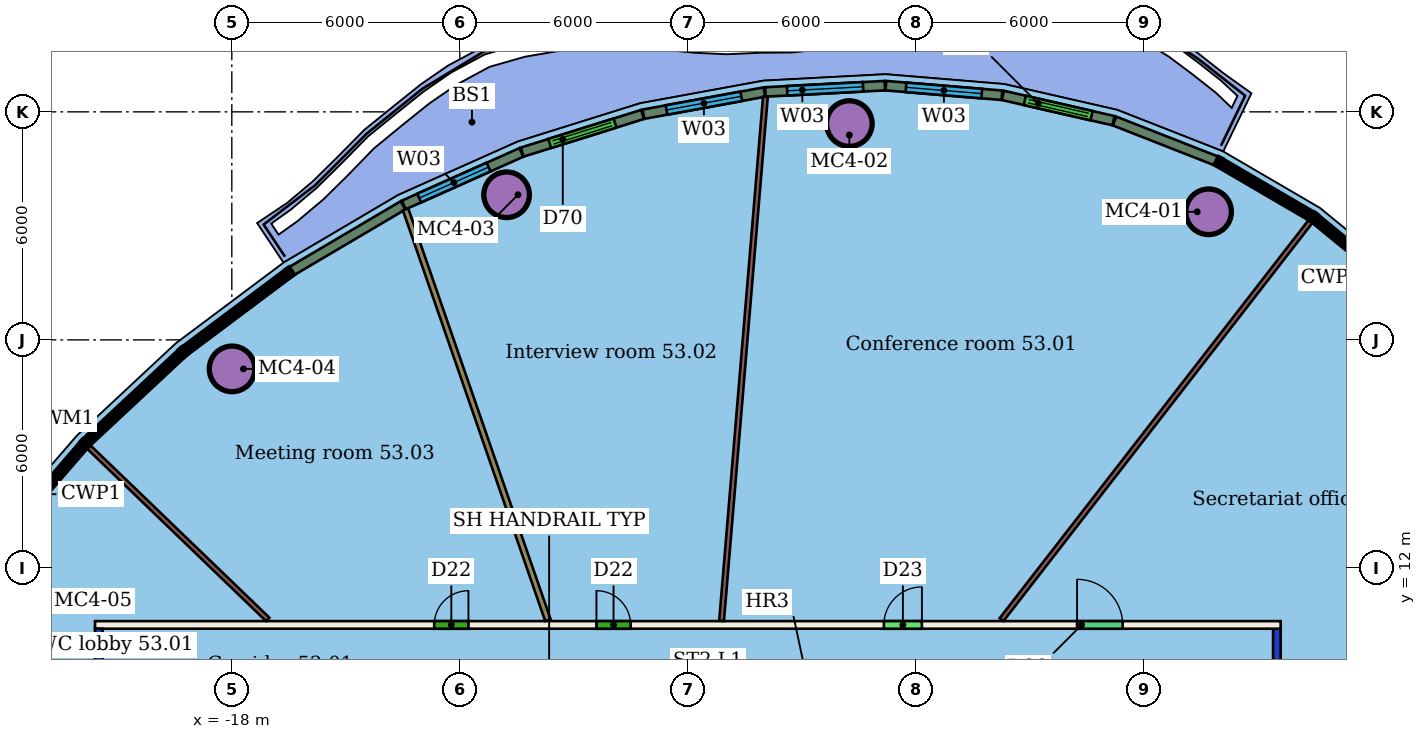
"""IFC4 building model, lengths in metres.
Left out: names, types, materials, properties, quantities, classifications, styles, units other than length and angle.
Written with IfcOpenShell. Run it as: python <this file> out.ifc"""

import sys

from ifc_helpers import new_model, si_unit, direction, frame, frame_2d, origin, origin_2d, place, context, subcontext, project, spatial, rectangle, hollow_circle, extrude, element, fill, save


model = new_model("IFC4")
c1 = context("Model", 3, precision=1e-05, world=origin(), true_north=direction((0.0, 1.0)))
c2 = subcontext(c1, "Body", "Model", "MODEL_VIEW")
j1 = project(units=[si_unit("LENGTHUNIT", "METRE"), si_unit("PLANEANGLEUNIT", "RADIAN")], contexts=[c1])
p1 = place(None, origin())
s1 = spatial("IfcSite", under=j1, at=p1, CompositionType="ELEMENT")
p2 = place(p1, origin())
s2 = spatial("IfcBuilding", under=s1, at=p2, CompositionType="ELEMENT")
p3 = place(p2, frame((0.0, 0.0, 217.3)))
s3 = spatial("IfcBuildingStorey", under=s2, at=p3, CompositionType="ELEMENT", Elevation=217.3)
for number, where, z_axis, x_axis in (
    (1, (7.704, 21.37, 0.0), (0.0, 0.0, 1.0), (1.0, 0.0, 0.0)),
    (2, (-1.75, 23.691, 0.0), (0.0, 0.0, 1.0), (1.0, 0.0, 0.0)),
    (3, (-10.769, 21.819, 0.0), (0.0, 0.0, 1.0), (1.0, 0.0, 0.0)),
    (4, (-17.993, 17.237, 0.0), (0.0, 0.0, 1.0), (1.0, 0.0, 0.0)),
):
    element("IfcColumn", number, at=place(p3, frame(where, z_axis=z_axis, x_axis=x_axis)), inside=s3, PredefinedType="COLUMN", context=c2, shape_type="SweptSolid", body=[
        extrude(hollow_circle(Radius=0.6, WallThickness=0.045, at=origin_2d()), origin(), (0.0, 0.0, 1.0), 3.45),
    ])
p4 = place(p3, frame((-21.5, -10.4, 0.0), z_axis=(0.0, 0.0, 1.0), x_axis=(0.0, 1.0, 0.0)))
e5 = element("IfcWall", 5, at=p4, inside=s3, PredefinedType="PARTITIONING", context=c2, shape_type="SweptSolid", body=[
    extrude(rectangle(XDim=20.8, YDim=0.2, at=frame_2d((10.4, 0.0))), origin(), (0.0, 0.0, 1.0), 3.05),
])
p5 = place(p4, frame((13.596, 0.0, 0.0)))
e6 = element("IfcOpeningElement", 6, at=p5, cuts=e5, PredefinedType="OPENING", context=c2, shape_type="SweptSolid", body=[
    extrude(rectangle(XDim=1.0, YDim=2.4, at=frame_2d((0.5, 1.2))), frame((0.0, 0.11, 0.0), z_axis=(0.0, -1.0, 0.0), x_axis=(1.0, 0.0, 0.0)), (0.0, 0.0, 1.0), 0.22),
])
p6 = place(p4, frame((5.876, 0.0, 0.0)))
e7 = element("IfcOpeningElement", 7, at=p6, cuts=e5, PredefinedType="OPENING", context=c2, shape_type="SweptSolid", body=[
    extrude(rectangle(XDim=1.8, YDim=2.4, at=frame_2d((0.9, 1.2))), frame((0.0, 0.11, 0.0), z_axis=(0.0, -1.0, 0.0), x_axis=(1.0, 0.0, 0.0)), (0.0, 0.0, 1.0), 0.22),
])
p7 = place(p3, frame((-21.6, 10.5, 0.0), z_axis=(0.0, 0.0, 1.0), x_axis=(1.0, 0.0, 0.0)))
e8 = element("IfcWall", 8, at=p7, inside=s3, PredefinedType="PARTITIONING", context=c2, shape_type="SweptSolid", body=[
    extrude(rectangle(XDim=31.2, YDim=0.2, at=frame_2d((15.6, 0.0))), origin(), (0.0, 0.0, 1.0), 3.45),
])
p8 = place(p7, frame((20.759, 0.0, 0.0)))
e9 = element("IfcOpeningElement", 9, at=p8, cuts=e8, PredefinedType="OPENING", context=c2, shape_type="SweptSolid", body=[
    extrude(rectangle(XDim=1.0, YDim=2.4, at=frame_2d((0.5, 1.2))), frame((0.0, 0.11, 0.0), z_axis=(0.0, -1.0, 0.0), x_axis=(1.0, 0.0, 0.0)), (0.0, 0.0, 1.0), 0.22),
])
p9 = place(p7, frame((13.195, 0.0, 0.0)))
e10 = element("IfcOpeningElement", 10, at=p9, cuts=e8, PredefinedType="OPENING", context=c2, shape_type="SweptSolid", body=[
    extrude(rectangle(XDim=0.9, YDim=2.1, at=frame_2d((0.45, 1.05))), frame((0.0, 0.11, 0.0), z_axis=(0.0, -1.0, 0.0), x_axis=(1.0, 0.0, 0.0)), (0.0, 0.0, 1.0), 0.22),
])
p10 = place(p7, frame((8.927, 0.0, 0.0)))
e11 = element("IfcOpeningElement", 11, at=p10, cuts=e8, PredefinedType="OPENING", context=c2, shape_type="SweptSolid", body=[
    extrude(rectangle(XDim=0.9, YDim=2.1, at=frame_2d((0.45, 1.05))), frame((0.0, 0.11, 0.0), z_axis=(0.0, -1.0, 0.0), x_axis=(1.0, 0.0, 0.0)), (0.0, 0.0, 1.0), 0.22),
])
p11 = place(p7, frame((25.843, 0.0, 0.0)))
e12 = element("IfcOpeningElement", 12, at=p11, cuts=e8, PredefinedType="OPENING", context=c2, shape_type="SweptSolid", body=[
    extrude(rectangle(XDim=1.2, YDim=2.4, at=frame_2d((0.6, 1.2))), frame((0.0, 0.11, 0.0), z_axis=(0.0, -1.0, 0.0), x_axis=(1.0, 0.0, 0.0)), (0.0, 0.0, 1.0), 0.22),
])
p12 = place(p3, frame((9.5, 10.4, 0.0), z_axis=(0.0, 0.0, 1.0), x_axis=(0.0, -1.0, 0.0)))
e13 = element("IfcWall", 13, at=p12, inside=s3, PredefinedType="PARTITIONING", context=c2, shape_type="SweptSolid", body=[
    extrude(rectangle(XDim=20.8, YDim=0.2, at=frame_2d((10.4, 0.0))), origin(), (0.0, 0.0, 1.0), 3.05),
])
p13 = place(p12, frame((14.911, 0.0, 0.0)))
e14 = element("IfcOpeningElement", 14, at=p13, cuts=e13, PredefinedType="OPENING", context=c2, shape_type="SweptSolid", body=[
    extrude(rectangle(XDim=0.9, YDim=2.1, at=frame_2d((0.45, 1.05))), frame((0.0, 0.11, 0.0), z_axis=(0.0, -1.0, 0.0), x_axis=(1.0, 0.0, 0.0)), (0.0, 0.0, 1.0), 0.22),
])
p14 = place(p12, frame((4.489, 0.0, 0.0)))
e15 = element("IfcOpeningElement", 15, at=p14, cuts=e13, PredefinedType="OPENING", context=c2, shape_type="SweptSolid", body=[
    extrude(rectangle(XDim=1.5, YDim=2.1, at=frame_2d((0.75, 1.05))), frame((0.0, 0.11, 0.0), z_axis=(0.0, -1.0, 0.0), x_axis=(1.0, 0.0, 0.0)), (0.0, 0.0, 1.0), 0.22),
])
p15 = place(p3, frame((10.391, 21.124, 0.0), z_axis=(0.0, 0.0, 1.0), x_axis=(-0.613043629226, -0.790049054594, 0.0)))
e16 = element("IfcWall", 16, at=p15, inside=s3, PredefinedType="PARTITIONING", context=c2, shape_type="SweptSolid", body=[
    extrude(rectangle(XDim=13.271, YDim=0.125, at=frame_2d((6.636, 0.0))), origin(), (0.0, 0.0, 1.0), 3.45),
])
p16 = place(p3, frame((-3.958, 24.399, 0.0), z_axis=(0.0, 0.0, 1.0), x_axis=(-0.083375368872, -0.996518212511, 0.0)))
e17 = element("IfcWall", 17, at=p16, inside=s3, PredefinedType="PARTITIONING", context=c2, shape_type="SweptSolid", body=[
    extrude(rectangle(XDim=13.842, YDim=0.125, at=frame_2d((6.921, 0.0))), origin(), (0.0, 0.0, 1.0), 3.45),
])
p17 = place(p3, frame((-13.428, 21.434, 0.0), z_axis=(0.0, 0.0, 1.0), x_axis=(0.327447705094, -0.944869303358, 0.0)))
e18 = element("IfcWall", 18, at=p17, inside=s3, PredefinedType="PARTITIONING", context=c2, shape_type="SweptSolid", body=[
    extrude(rectangle(XDim=11.44, YDim=0.15, at=frame_2d((5.72, 0.0))), origin(), (0.0, 0.0, 1.0), 3.45),
])
p18 = place(p3, frame((-21.771, 15.187, 0.0), z_axis=(0.0, 0.0, 1.0), x_axis=(0.72030986436, -0.69365243408, 0.0)))
e19 = element("IfcWall", 19, at=p18, inside=s3, PredefinedType="PARTITIONING", context=c2, shape_type="SweptSolid", body=[
    extrude(rectangle(XDim=6.548, YDim=0.125, at=frame_2d((3.274, 0.0))), origin(), (0.0, 0.0, 1.0), 3.45),
])
p19 = place(p3, frame((17.207, 12.061, 0.0), z_axis=(0.0, 0.0, 1.0), x_axis=(-0.887319286248, -0.461155596574, 0.0)))
e20 = element("IfcWall", 20, at=p19, inside=s3, PredefinedType="PARTITIONING", context=c2, shape_type="SweptSolid", body=[
    extrude(rectangle(XDim=8.54, YDim=0.125, at=frame_2d((4.27, 0.0))), origin(), (0.0, 0.0, 1.0), 3.45),
])
p20 = place(p3, frame((7.907, 22.708, 0.0), z_axis=(0.0, 0.0, 1.0), x_axis=(-0.930924579426, 0.365211483146, 0.0)))
e21 = element("IfcWall", 21, at=p20, inside=s3, PredefinedType="SOLIDWALL", context=c2, shape_type="SweptSolid", body=[
    extrude(rectangle(XDim=2.878, YDim=0.25, at=frame_2d((1.439, 0.0))), origin(), (0.0, 0.0, 1.0), 3.1),
])
p21 = place(p3, frame((5.202, 23.767, 0.0), z_axis=(0.0, 0.0, 1.0), x_axis=(-0.974849372508, 0.222864759263, 0.0)))
e22 = element("IfcWall", 22, at=p21, inside=s3, PredefinedType="SOLIDWALL", context=c2, shape_type="SweptSolid", body=[
    extrude(rectangle(XDim=2.986, YDim=0.25, at=frame_2d((1.493, 0.0))), origin(), (0.0, 0.0, 1.0), 3.1),
])
p22 = place(p21, frame((0.593, 0.0, 0.0)))
e23 = element("IfcOpeningElement", 23, at=p22, cuts=e22, PredefinedType="OPENING", context=c2, shape_type="SweptSolid", body=[
    extrude(rectangle(XDim=1.8, YDim=2.4, at=frame_2d((0.9, 1.2))), frame((0.0, 0.135, 0.0), z_axis=(0.0, -1.0, 0.0), x_axis=(1.0, 0.0, 0.0)), (0.0, 0.0, 1.0), 0.27),
])
p23 = place(p3, frame((2.265, 24.437, 0.0), z_axis=(0.0, 0.0, 1.0), x_axis=(-0.996603192192, 0.082353368555, 0.0)))
e24 = element("IfcWall", 24, at=p23, inside=s3, PredefinedType="SOLIDWALL", context=c2, shape_type="SweptSolid", body=[
    extrude(rectangle(XDim=3.065, YDim=0.25, at=frame_2d((1.533, 0.0))), origin(), (0.0, 0.0, 1.0), 3.1),
])
p24 = place(p23, frame((0.533, 0.0, 0.9)))
e25 = element("IfcOpeningElement", 25, at=p24, cuts=e24, PredefinedType="OPENING", context=c2, shape_type="SweptSolid", body=[
    extrude(rectangle(XDim=2.0, YDim=2.1, at=frame_2d((1.0, 1.05))), frame((0.0, 0.135, 0.0), z_axis=(0.0, -1.0, 0.0), x_axis=(1.0, 0.0, 0.0)), (0.0, 0.0, 1.0), 0.27),
])
p25 = place(p3, frame((-0.814, 24.689, 0.0), z_axis=(0.0, 0.0, 1.0), x_axis=(-0.998611186538, -0.052684894627, 0.0)))
e26 = element("IfcWall", 26, at=p25, inside=s3, PredefinedType="SOLIDWALL", context=c2, shape_type="SweptSolid", body=[
    extrude(rectangle(XDim=3.151, YDim=0.25, at=frame_2d((1.576, 0.0))), origin(), (0.0, 0.0, 1.0), 3.1),
])
p26 = place(p25, frame((0.575, 0.0, 0.9)))
e27 = element("IfcOpeningElement", 27, at=p26, cuts=e26, PredefinedType="OPENING", context=c2, shape_type="SweptSolid", body=[
    extrude(rectangle(XDim=2.0, YDim=2.1, at=frame_2d((1.0, 1.05))), frame((0.0, 0.135, 0.0), z_axis=(0.0, -1.0, 0.0), x_axis=(1.0, 0.0, 0.0)), (0.0, 0.0, 1.0), 0.27),
])
p27 = place(p3, frame((-3.985, 24.521, 0.0), z_axis=(0.0, 0.0, 1.0), x_axis=(-0.98363864292, -0.180152768931, 0.0)))
e28 = element("IfcWall", 28, at=p27, inside=s3, PredefinedType="SOLIDWALL", context=c2, shape_type="SweptSolid", body=[
    extrude(rectangle(XDim=3.238, YDim=0.25, at=frame_2d((1.619, 0.0))), origin(), (0.0, 0.0, 1.0), 3.1),
])
p28 = place(p27, frame((0.619, 0.0, 0.9)))
e29 = element("IfcOpeningElement", 29, at=p28, cuts=e28, PredefinedType="OPENING", context=c2, shape_type="SweptSolid", body=[
    extrude(rectangle(XDim=2.0, YDim=2.1, at=frame_2d((1.0, 1.05))), frame((0.0, 0.135, 0.0), z_axis=(0.0, -1.0, 0.0), x_axis=(1.0, 0.0, 0.0)), (0.0, 0.0, 1.0), 0.27),
])
p29 = place(p3, frame((-7.192, 23.932, 0.0), z_axis=(0.0, 0.0, 1.0), x_axis=(-0.954355541855, -0.298672897551, 0.0)))
e30 = element("IfcWall", 30, at=p29, inside=s3, PredefinedType="SOLIDWALL", context=c2, shape_type="SweptSolid", body=[
    extrude(rectangle(XDim=3.319, YDim=0.25, at=frame_2d((1.659, 0.0))), origin(), (0.0, 0.0, 1.0), 3.1),
])
p30 = place(p29, frame((0.759, 0.0, 0.0)))
e31 = element("IfcOpeningElement", 31, at=p30, cuts=e30, PredefinedType="OPENING", context=c2, shape_type="SweptSolid", body=[
    extrude(rectangle(XDim=1.8, YDim=2.4, at=frame_2d((0.9, 1.2))), frame((0.0, 0.135, 0.0), z_axis=(0.0, -1.0, 0.0), x_axis=(1.0, 0.0, 0.0)), (0.0, 0.0, 1.0), 0.27),
])
p31 = place(p3, frame((-10.38, 22.933, 0.0), z_axis=(0.0, 0.0, 1.0), x_axis=(-0.913013847156, -0.40792856593, 0.0)))
e32 = element("IfcWall", 32, at=p31, inside=s3, PredefinedType="SOLIDWALL", context=c2, shape_type="SweptSolid", body=[
    extrude(rectangle(XDim=3.39, YDim=0.25, at=frame_2d((1.695, 0.0))), origin(), (0.0, 0.0, 1.0), 3.1),
])
p32 = place(p31, frame((0.945, 0.0, 0.9)))
e33 = element("IfcOpeningElement", 33, at=p32, cuts=e32, PredefinedType="OPENING", context=c2, shape_type="SweptSolid", body=[
    extrude(rectangle(XDim=2.0, YDim=2.1, at=frame_2d((1.0, 1.05))), frame((0.0, 0.135, 0.0), z_axis=(0.0, -1.0, 0.0), x_axis=(1.0, 0.0, 0.0)), (0.0, 0.0, 1.0), 0.27),
])
p33 = place(p3, frame((-13.495, 21.54, 0.0), z_axis=(0.0, 0.0, 1.0), x_axis=(-0.861311961965, -0.508076474731, 0.0)))
e34 = element("IfcWall", 34, at=p33, inside=s3, PredefinedType="SOLIDWALL", context=c2, shape_type="SweptSolid", body=[
    extrude(rectangle(XDim=3.403, YDim=0.25, at=frame_2d((1.701, 0.0))), origin(), (0.0, 0.0, 1.0), 3.1),
])
p34 = place(p8, origin())
e35 = element("IfcDoor", 35, at=p34, inside=s3, OperationType="SINGLE_SWING_RIGHT", PredefinedType="DOOR", context=c2, shape_type="SweptSolid", body=[
    extrude(rectangle(XDim=1.0, YDim=2.4, at=frame_2d((0.5, 1.2))), frame((0.0, 0.025, 0.0), z_axis=(0.0, -1.0, 0.0), x_axis=(1.0, 0.0, 0.0)), (0.0, 0.0, 1.0), 0.05),
])
fill(e9, e35)
p35 = place(p9, origin())
e36 = element("IfcDoor", 36, at=p35, inside=s3, OperationType="SINGLE_SWING_LEFT", PredefinedType="DOOR", context=c2, shape_type="SweptSolid", body=[
    extrude(rectangle(XDim=0.9, YDim=2.1, at=frame_2d((0.45, 1.05))), frame((0.0, 0.025, 0.0), z_axis=(0.0, -1.0, 0.0), x_axis=(1.0, 0.0, 0.0)), (0.0, 0.0, 1.0), 0.05),
])
fill(e10, e36)
p36 = place(p10, origin())
e37 = element("IfcDoor", 37, at=p36, inside=s3, OperationType="SINGLE_SWING_RIGHT", PredefinedType="DOOR", context=c2, shape_type="SweptSolid", body=[
    extrude(rectangle(XDim=0.9, YDim=2.1, at=frame_2d((0.45, 1.05))), frame((0.0, 0.025, 0.0), z_axis=(0.0, -1.0, 0.0), x_axis=(1.0, 0.0, 0.0)), (0.0, 0.0, 1.0), 0.05),
])
fill(e11, e37)
p37 = place(p11, origin())
e38 = element("IfcDoor", 38, at=p37, inside=s3, OperationType="SINGLE_SWING_LEFT", PredefinedType="DOOR", context=c2, shape_type="SweptSolid", body=[
    extrude(rectangle(XDim=1.2, YDim=2.4, at=frame_2d((0.6, 1.2))), frame((0.0, 0.025, 0.0), z_axis=(0.0, -1.0, 0.0), x_axis=(1.0, 0.0, 0.0)), (0.0, 0.0, 1.0), 0.05),
])
fill(e12, e38)
p38 = place(p22, origin())
e39 = element("IfcDoor", 39, at=p38, inside=s3, OperationType="DOUBLE_DOOR_SLIDING", PredefinedType="DOOR", context=c2, shape_type="SweptSolid", body=[
    extrude(rectangle(XDim=1.8, YDim=2.4, at=frame_2d((0.9, 1.2))), frame((0.0, 0.025, 0.0), z_axis=(0.0, -1.0, 0.0), x_axis=(1.0, 0.0, 0.0)), (0.0, 0.0, 1.0), 0.05),
])
fill(e23, e39)
p39 = place(p24, origin())
e40 = element("IfcWindow", 40, at=p39, inside=s3, PartitioningType="SINGLE_PANEL", PredefinedType="WINDOW", context=c2, shape_type="SweptSolid", body=[
    extrude(rectangle(XDim=2.0, YDim=2.1, at=frame_2d((1.0, 1.05))), frame((0.0, 0.03, 0.0), z_axis=(0.0, -1.0, 0.0), x_axis=(1.0, 0.0, 0.0)), (0.0, 0.0, 1.0), 0.06),
])
fill(e25, e40)
p40 = place(p26, origin())
e41 = element("IfcWindow", 41, at=p40, inside=s3, PartitioningType="SINGLE_PANEL", PredefinedType="WINDOW", context=c2, shape_type="SweptSolid", body=[
    extrude(rectangle(XDim=2.0, YDim=2.1, at=frame_2d((1.0, 1.05))), frame((0.0, 0.03, 0.0), z_axis=(0.0, -1.0, 0.0), x_axis=(1.0, 0.0, 0.0)), (0.0, 0.0, 1.0), 0.06),
])
fill(e27, e41)
p41 = place(p28, origin())
e42 = element("IfcWindow", 42, at=p41, inside=s3, PartitioningType="SINGLE_PANEL", PredefinedType="WINDOW", context=c2, shape_type="SweptSolid", body=[
    extrude(rectangle(XDim=2.0, YDim=2.1, at=frame_2d((1.0, 1.05))), frame((0.0, 0.03, 0.0), z_axis=(0.0, -1.0, 0.0), x_axis=(1.0, 0.0, 0.0)), (0.0, 0.0, 1.0), 0.06),
])
fill(e29, e42)
p42 = place(p30, origin())
e43 = element("IfcDoor", 43, at=p42, inside=s3, OperationType="DOUBLE_DOOR_SLIDING", PredefinedType="DOOR", context=c2, shape_type="SweptSolid", body=[
    extrude(rectangle(XDim=1.8, YDim=2.4, at=frame_2d((0.9, 1.2))), frame((0.0, 0.025, 0.0), z_axis=(0.0, -1.0, 0.0), x_axis=(1.0, 0.0, 0.0)), (0.0, 0.0, 1.0), 0.05),
])
fill(e31, e43)
p43 = place(p32, origin())
e44 = element("IfcWindow", 44, at=p43, inside=s3, PartitioningType="SINGLE_PANEL", PredefinedType="WINDOW", context=c2, shape_type="SweptSolid", body=[
    extrude(rectangle(XDim=2.0, YDim=2.1, at=frame_2d((1.0, 1.05))), frame((0.0, 0.03, 0.0), z_axis=(0.0, -1.0, 0.0), x_axis=(1.0, 0.0, 0.0)), (0.0, 0.0, 1.0), 0.06),
])
fill(e33, e44)
save(model, sys.argv[1])
